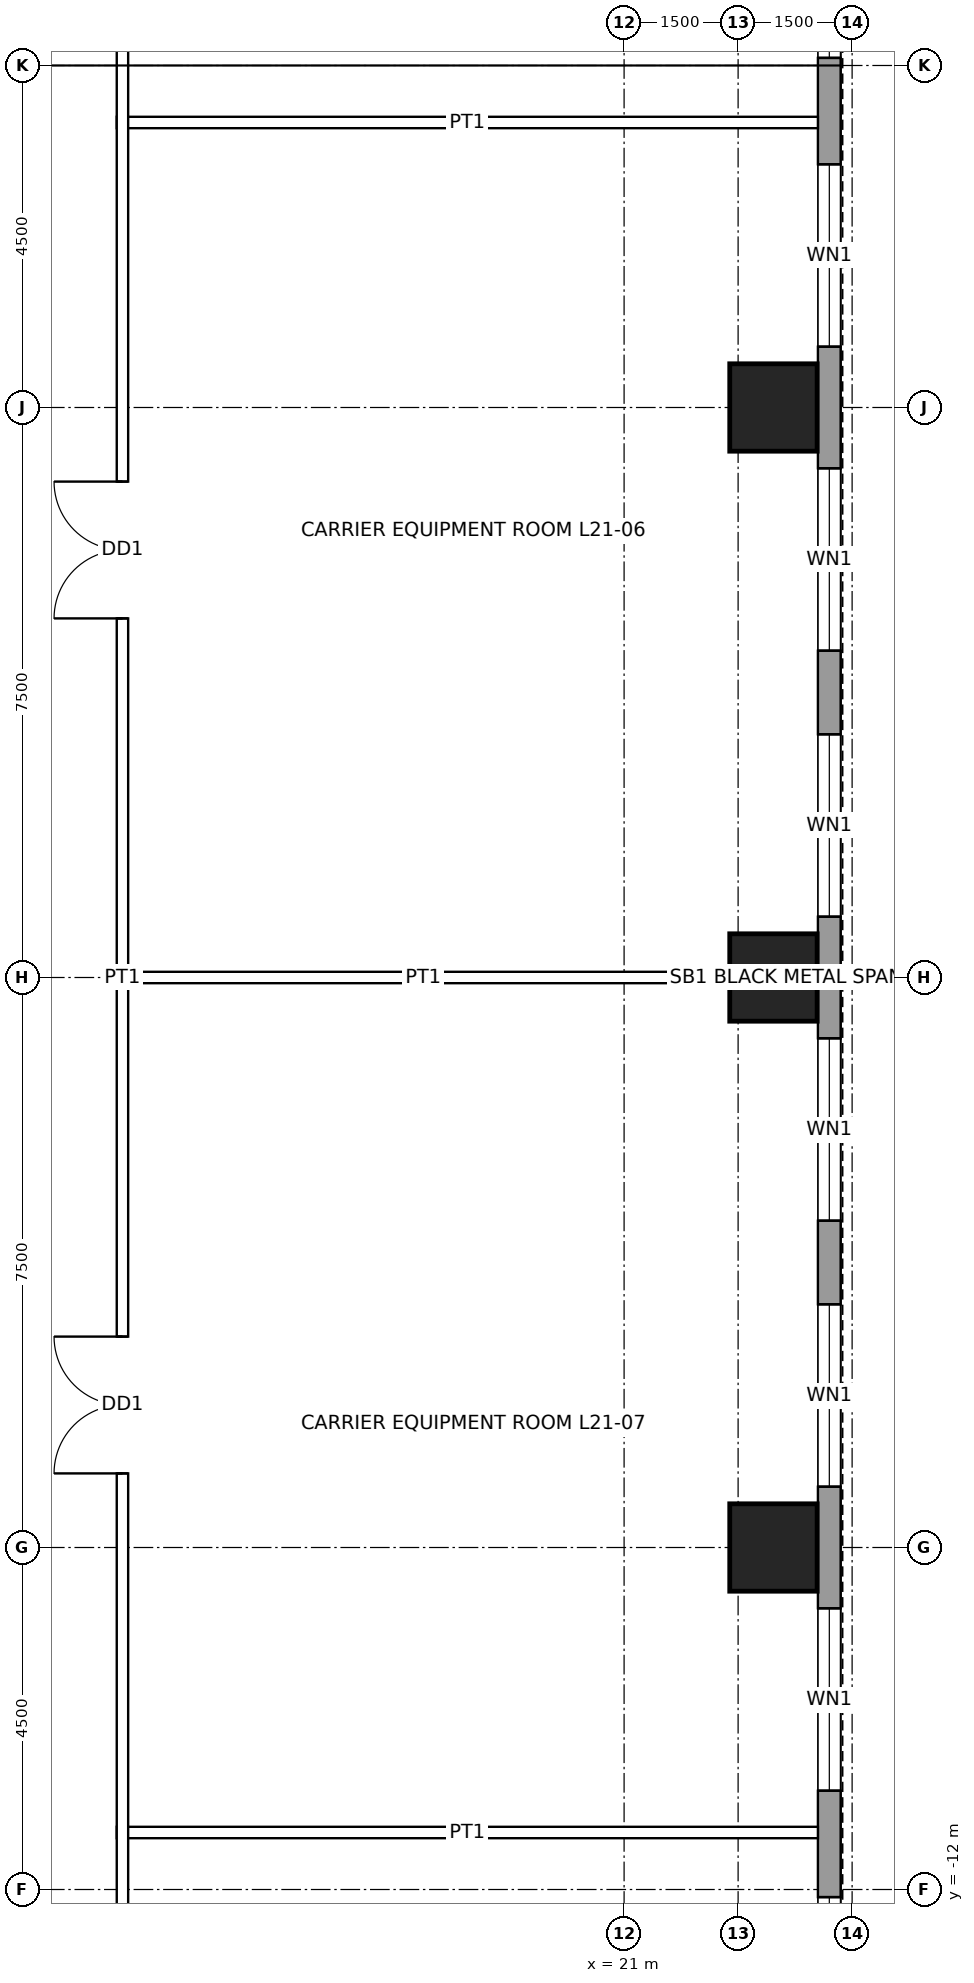
"""IFC4 building model, lengths in metres.
Left out: names, types, materials, properties, quantities, classifications, styles, units other than length and angle.
Written with IfcOpenShell. Run it as: python <this file> out.ifc"""

import sys

from ifc_helpers import new_model, si_unit, direction, frame, frame_2d, origin, origin_2d, place, context, subcontext, project, spatial, rectangle, hollow_rectangle, extrude, element, fill, save


model = new_model("IFC4")
c1 = context("Model", 3, precision=1e-05, world=origin(), true_north=direction((0.0, 1.0)))
c2 = subcontext(c1, "Body", "Model", "MODEL_VIEW")
j1 = project(units=[si_unit("LENGTHUNIT", "METRE"), si_unit("PLANEANGLEUNIT", "RADIAN")], contexts=[c1])
p1 = place(None, origin())
s1 = spatial("IfcSite", under=j1, at=p1, CompositionType="ELEMENT")
p2 = place(p1, origin())
s2 = spatial("IfcBuilding", under=s1, at=p2, CompositionType="ELEMENT")
p3 = place(p2, frame((0.0, 0.0, 108.9)))
s3 = spatial("IfcBuildingStorey", under=s2, at=p3, CompositionType="ELEMENT", Elevation=108.9)
for number, where, z_axis, x_axis in (
    (1, (22.965, 7.5, 0.0), (0.0, 0.0, 1.0), (1.0, 0.0, 0.0)),
    (2, (22.965, 0.0, 0.0), (0.0, 0.0, 1.0), (1.0, 0.0, 0.0)),
    (3, (22.965, -7.5, 0.0), (0.0, 0.0, 1.0), (1.0, 0.0, 0.0)),
):
    element("IfcColumn", number, at=place(p3, frame(where, z_axis=z_axis, x_axis=x_axis)), inside=s3, PredefinedType="COLUMN", context=c2, shape_type="SweptSolid", body=[
        extrude(hollow_rectangle(XDim=1.15, YDim=1.15, WallThickness=0.075, at=origin_2d()), origin(), (0.0, 0.0, 1.0), 4.5),
    ])
p4 = place(p3, frame((23.7, 16.2, 0.0), z_axis=(0.0, 0.0, 1.0), x_axis=(0.0, -1.0, 0.0)))
e4 = element("IfcWall", 4, at=p4, inside=s3, PredefinedType="SOLIDWALL", context=c2, shape_type="SweptSolid", body=[
    extrude(rectangle(XDim=32.4, YDim=0.3, at=frame_2d((16.2, 0.0))), origin(), (0.0, 0.0, 1.0), 4.3),
])
p5 = place(p4, frame((2.3, 0.0, 1.0)))
e5 = element("IfcOpeningElement", 5, at=p5, cuts=e4, PredefinedType="OPENING", context=c2, shape_type="SweptSolid", body=[
    extrude(rectangle(XDim=1.8, YDim=1.2, at=frame_2d((0.9, 0.6))), frame((0.0, 0.16, 0.0), z_axis=(0.0, -1.0, 0.0), x_axis=(1.0, 0.0, 0.0)), (0.0, 0.0, 1.0), 0.32),
])
p6 = place(p4, frame((5.5, 0.0, 1.0)))
e6 = element("IfcOpeningElement", 6, at=p6, cuts=e4, PredefinedType="OPENING", context=c2, shape_type="SweptSolid", body=[
    extrude(rectangle(XDim=2.4, YDim=1.2, at=frame_2d((1.2, 0.6))), frame((0.0, 0.16, 0.0), z_axis=(0.0, -1.0, 0.0), x_axis=(1.0, 0.0, 0.0)), (0.0, 0.0, 1.0), 0.32),
])
p7 = place(p4, frame((9.5, 0.0, 1.0)))
e7 = element("IfcOpeningElement", 7, at=p7, cuts=e4, PredefinedType="OPENING", context=c2, shape_type="SweptSolid", body=[
    extrude(rectangle(XDim=2.4, YDim=1.2, at=frame_2d((1.2, 0.6))), frame((0.0, 0.16, 0.0), z_axis=(0.0, -1.0, 0.0), x_axis=(1.0, 0.0, 0.0)), (0.0, 0.0, 1.0), 0.32),
])
p8 = place(p4, frame((13.0, 0.0, 1.0)))
e8 = element("IfcOpeningElement", 8, at=p8, cuts=e4, PredefinedType="OPENING", context=c2, shape_type="SweptSolid", body=[
    extrude(rectangle(XDim=2.4, YDim=1.2, at=frame_2d((1.2, 0.6))), frame((0.0, 0.16, 0.0), z_axis=(0.0, -1.0, 0.0), x_axis=(1.0, 0.0, 0.0)), (0.0, 0.0, 1.0), 0.32),
])
p9 = place(p4, frame((17.0, 0.0, 1.0)))
e9 = element("IfcOpeningElement", 9, at=p9, cuts=e4, PredefinedType="OPENING", context=c2, shape_type="SweptSolid", body=[
    extrude(rectangle(XDim=2.4, YDim=1.2, at=frame_2d((1.2, 0.6))), frame((0.0, 0.16, 0.0), z_axis=(0.0, -1.0, 0.0), x_axis=(1.0, 0.0, 0.0)), (0.0, 0.0, 1.0), 0.32),
])
p10 = place(p4, frame((20.5, 0.0, 1.0)))
e10 = element("IfcOpeningElement", 10, at=p10, cuts=e4, PredefinedType="OPENING", context=c2, shape_type="SweptSolid", body=[
    extrude(rectangle(XDim=2.4, YDim=1.2, at=frame_2d((1.2, 0.6))), frame((0.0, 0.16, 0.0), z_axis=(0.0, -1.0, 0.0), x_axis=(1.0, 0.0, 0.0)), (0.0, 0.0, 1.0), 0.32),
])
p11 = place(p4, frame((24.5, 0.0, 1.0)))
e11 = element("IfcOpeningElement", 11, at=p11, cuts=e4, PredefinedType="OPENING", context=c2, shape_type="SweptSolid", body=[
    extrude(rectangle(XDim=2.4, YDim=1.2, at=frame_2d((1.2, 0.6))), frame((0.0, 0.16, 0.0), z_axis=(0.0, -1.0, 0.0), x_axis=(1.0, 0.0, 0.0)), (0.0, 0.0, 1.0), 0.32),
])
p12 = place(p4, frame((28.3, 0.0, 1.0)))
e12 = element("IfcOpeningElement", 12, at=p12, cuts=e4, PredefinedType="OPENING", context=c2, shape_type="SweptSolid", body=[
    extrude(rectangle(XDim=1.8, YDim=1.2, at=frame_2d((0.9, 0.6))), frame((0.0, 0.16, 0.0), z_axis=(0.0, -1.0, 0.0), x_axis=(1.0, 0.0, 0.0)), (0.0, 0.0, 1.0), 0.32),
])
p13 = place(p3, frame((14.325, -11.25, 0.0), z_axis=(0.0, 0.0, 1.0), x_axis=(1.0, 0.0, 0.0)))
e13 = element("IfcWall", 13, at=p13, inside=s3, PredefinedType="PARTITIONING", context=c2, shape_type="SweptSolid", body=[
    extrude(rectangle(XDim=9.225, YDim=0.15, at=frame_2d((4.613, 0.0))), origin(), (0.0, 0.0, 1.0), 3.431),
])
p14 = place(p3, frame((14.325, 0.0, 0.0), z_axis=(0.0, 0.0, 1.0), x_axis=(1.0, 0.0, 0.0)))
e14 = element("IfcWall", 14, at=p14, inside=s3, PredefinedType="PARTITIONING", context=c2, shape_type="SweptSolid", body=[
    extrude(rectangle(XDim=8.065, YDim=0.15, at=frame_2d((4.032, 0.0))), origin(), (0.0, 0.0, 1.0), 3.431),
])
p15 = place(p3, frame((14.325, 11.25, 0.0), z_axis=(0.0, 0.0, 1.0), x_axis=(1.0, 0.0, 0.0)))
e15 = element("IfcWall", 15, at=p15, inside=s3, PredefinedType="PARTITIONING", context=c2, shape_type="SweptSolid", body=[
    extrude(rectangle(XDim=9.225, YDim=0.15, at=frame_2d((4.613, 0.0))), origin(), (0.0, 0.0, 1.0), 3.431),
])
p16 = place(p3, frame((14.4, -14.475, 0.0), z_axis=(0.0, 0.0, 1.0), x_axis=(0.0, 1.0, 0.0)))
e16 = element("IfcWall", 16, at=p16, inside=s3, PredefinedType="PARTITIONING", context=c2, shape_type="SweptSolid", body=[
    extrude(rectangle(XDim=28.95, YDim=0.15, at=frame_2d((14.475, 0.0))), origin(), (0.0, 0.0, 1.0), 4.3),
])
p17 = place(p16, frame((19.2, 0.0, 0.0)))
e17 = element("IfcOpeningElement", 17, at=p17, cuts=e16, PredefinedType="OPENING", context=c2, shape_type="SweptSolid", body=[
    extrude(rectangle(XDim=1.8, YDim=2.4, at=frame_2d((0.9, 1.2))), frame((0.0, 0.085, 0.0), z_axis=(0.0, -1.0, 0.0), x_axis=(1.0, 0.0, 0.0)), (0.0, 0.0, 1.0), 0.17),
])
p18 = place(p16, frame((7.95, 0.0, 0.0)))
e18 = element("IfcOpeningElement", 18, at=p18, cuts=e16, PredefinedType="OPENING", context=c2, shape_type="SweptSolid", body=[
    extrude(rectangle(XDim=1.8, YDim=2.4, at=frame_2d((0.9, 1.2))), frame((0.0, 0.085, 0.0), z_axis=(0.0, -1.0, 0.0), x_axis=(1.0, 0.0, 0.0)), (0.0, 0.0, 1.0), 0.17),
])
p19 = place(p5, origin())
e19 = element("IfcWindow", 19, at=p19, inside=s3, PartitioningType="SINGLE_PANEL", PredefinedType="WINDOW", context=c2, shape_type="SweptSolid", body=[
    extrude(rectangle(XDim=1.8, YDim=1.2, at=frame_2d((0.9, 0.6))), frame((0.0, 0.03, 0.0), z_axis=(0.0, -1.0, 0.0), x_axis=(1.0, 0.0, 0.0)), (0.0, 0.0, 1.0), 0.06),
])
fill(e5, e19)
p20 = place(p6, origin())
e20 = element("IfcWindow", 20, at=p20, inside=s3, PartitioningType="SINGLE_PANEL", PredefinedType="WINDOW", context=c2, shape_type="SweptSolid", body=[
    extrude(rectangle(XDim=2.4, YDim=1.2, at=frame_2d((1.2, 0.6))), frame((0.0, 0.03, 0.0), z_axis=(0.0, -1.0, 0.0), x_axis=(1.0, 0.0, 0.0)), (0.0, 0.0, 1.0), 0.06),
])
fill(e6, e20)
p21 = place(p7, origin())
e21 = element("IfcWindow", 21, at=p21, inside=s3, PartitioningType="SINGLE_PANEL", PredefinedType="WINDOW", context=c2, shape_type="SweptSolid", body=[
    extrude(rectangle(XDim=2.4, YDim=1.2, at=frame_2d((1.2, 0.6))), frame((0.0, 0.03, 0.0), z_axis=(0.0, -1.0, 0.0), x_axis=(1.0, 0.0, 0.0)), (0.0, 0.0, 1.0), 0.06),
])
fill(e7, e21)
p22 = place(p8, origin())
e22 = element("IfcWindow", 22, at=p22, inside=s3, PartitioningType="SINGLE_PANEL", PredefinedType="WINDOW", context=c2, shape_type="SweptSolid", body=[
    extrude(rectangle(XDim=2.4, YDim=1.2, at=frame_2d((1.2, 0.6))), frame((0.0, 0.03, 0.0), z_axis=(0.0, -1.0, 0.0), x_axis=(1.0, 0.0, 0.0)), (0.0, 0.0, 1.0), 0.06),
])
fill(e8, e22)
p23 = place(p9, origin())
e23 = element("IfcWindow", 23, at=p23, inside=s3, PartitioningType="SINGLE_PANEL", PredefinedType="WINDOW", context=c2, shape_type="SweptSolid", body=[
    extrude(rectangle(XDim=2.4, YDim=1.2, at=frame_2d((1.2, 0.6))), frame((0.0, 0.03, 0.0), z_axis=(0.0, -1.0, 0.0), x_axis=(1.0, 0.0, 0.0)), (0.0, 0.0, 1.0), 0.06),
])
fill(e9, e23)
p24 = place(p10, origin())
e24 = element("IfcWindow", 24, at=p24, inside=s3, PartitioningType="SINGLE_PANEL", PredefinedType="WINDOW", context=c2, shape_type="SweptSolid", body=[
    extrude(rectangle(XDim=2.4, YDim=1.2, at=frame_2d((1.2, 0.6))), frame((0.0, 0.03, 0.0), z_axis=(0.0, -1.0, 0.0), x_axis=(1.0, 0.0, 0.0)), (0.0, 0.0, 1.0), 0.06),
])
fill(e10, e24)
p25 = place(p11, origin())
e25 = element("IfcWindow", 25, at=p25, inside=s3, PartitioningType="SINGLE_PANEL", PredefinedType="WINDOW", context=c2, shape_type="SweptSolid", body=[
    extrude(rectangle(XDim=2.4, YDim=1.2, at=frame_2d((1.2, 0.6))), frame((0.0, 0.03, 0.0), z_axis=(0.0, -1.0, 0.0), x_axis=(1.0, 0.0, 0.0)), (0.0, 0.0, 1.0), 0.06),
])
fill(e11, e25)
p26 = place(p12, origin())
e26 = element("IfcWindow", 26, at=p26, inside=s3, PartitioningType="SINGLE_PANEL", PredefinedType="WINDOW", context=c2, shape_type="SweptSolid", body=[
    extrude(rectangle(XDim=1.8, YDim=1.2, at=frame_2d((0.9, 0.6))), frame((0.0, 0.03, 0.0), z_axis=(0.0, -1.0, 0.0), x_axis=(1.0, 0.0, 0.0)), (0.0, 0.0, 1.0), 0.06),
])
fill(e12, e26)
p27 = place(p17, origin())
e27 = element("IfcDoor", 27, at=p27, inside=s3, OperationType="DOUBLE_DOOR_SINGLE_SWING", PredefinedType="DOOR", context=c2, shape_type="SweptSolid", body=[
    extrude(rectangle(XDim=1.8, YDim=2.4, at=frame_2d((0.9, 1.2))), frame((0.0, 0.025, 0.0), z_axis=(0.0, -1.0, 0.0), x_axis=(1.0, 0.0, 0.0)), (0.0, 0.0, 1.0), 0.05),
])
fill(e17, e27)
p28 = place(p18, origin())
e28 = element("IfcDoor", 28, at=p28, inside=s3, OperationType="DOUBLE_DOOR_SINGLE_SWING", PredefinedType="DOOR", context=c2, shape_type="SweptSolid", body=[
    extrude(rectangle(XDim=1.8, YDim=2.4, at=frame_2d((0.9, 1.2))), frame((0.0, 0.025, 0.0), z_axis=(0.0, -1.0, 0.0), x_axis=(1.0, 0.0, 0.0)), (0.0, 0.0, 1.0), 0.05),
])
fill(e18, e28)
save(model, sys.argv[1])
